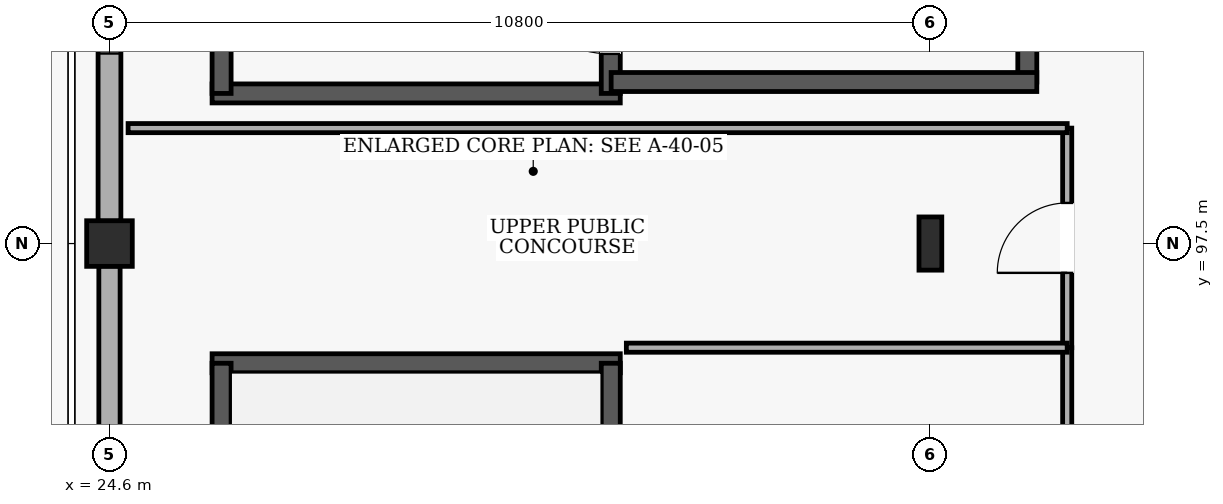
"""IFC4 building model, lengths in metres.
Left out: names, types, materials, properties, quantities, classifications, styles, units other than length and angle.
Written with IfcOpenShell. Run it as: python <this file> out.ifc"""

import sys

from ifc_helpers import new_model, si_unit, direction, frame, frame_2d, origin, origin_2d, place, context, subcontext, project, spatial, rectangle, i_section, extrude, element, fill, save


model = new_model("IFC4")
c1 = context("Model", 3, precision=1e-05, world=origin(), true_north=direction((0.0, 1.0)))
c2 = subcontext(c1, "Body", "Model", "MODEL_VIEW")
j1 = project(units=[si_unit("LENGTHUNIT", "METRE"), si_unit("PLANEANGLEUNIT", "RADIAN")], contexts=[c1])
p1 = place(None, origin())
s1 = spatial("IfcSite", under=j1, at=p1, CompositionType="ELEMENT")
p2 = place(p1, origin())
s2 = spatial("IfcBuilding", under=s1, at=p2, CompositionType="ELEMENT")
p3 = place(p2, frame((0.0, 0.0, 15.0)))
s3 = spatial("IfcBuildingStorey", under=s2, at=p3, CompositionType="ELEMENT", Elevation=15.0)
p4 = place(p3, frame((24.6, 97.5, 0.0), z_axis=(0.0, 0.0, 1.0), x_axis=(1.0, 0.0, 0.0)))
e1 = element("IfcColumn", 1, at=p4, inside=s3, PredefinedType="COLUMN", context=c2, shape_type="SweptSolid", body=[
    extrude(rectangle(XDim=0.6, YDim=0.6, at=origin_2d()), origin(), (0.0, 0.0, 1.0), 4.8),
])
p5 = place(p3, frame((35.4, 97.5, 0.0), z_axis=(0.0, 0.0, 1.0), x_axis=(1.0, 0.0, 0.0)))
e2 = element("IfcColumn", 2, at=p5, inside=s3, PredefinedType="COLUMN", context=c2, shape_type="SweptSolid", body=[
    extrude(i_section(OverallWidth=0.3, OverallDepth=0.7, WebThickness=0.017, FlangeThickness=0.032, at=origin_2d()), origin(), (0.0, 0.0, 1.0), 4.8),
])
p6 = place(p3, frame((24.6, 83.395, 0.0), z_axis=(0.0, 0.0, 1.0), x_axis=(0.0, 1.0, 0.0)))
e3 = element("IfcWall", 3, at=p6, inside=s3, PredefinedType="SOLIDWALL", context=c2, shape_type="SweptSolid", body=[
    extrude(rectangle(XDim=13.81, YDim=0.28, at=frame_2d((6.905, 0.0))), origin(), (0.0, 0.0, 1.0), 3.58),
])
p7 = place(p6, frame((6.005, 0.0, 0.9)))
e4 = element("IfcOpeningElement", 4, at=p7, cuts=e3, PredefinedType="OPENING", context=c2, shape_type="SweptSolid", body=[
    extrude(rectangle(XDim=1.8, YDim=2.1, at=frame_2d((0.9, 1.05))), frame((0.0, 0.15, 0.0), z_axis=(0.0, -1.0, 0.0), x_axis=(1.0, 0.0, 0.0)), (0.0, 0.0, 1.0), 0.3),
])
p8 = place(p3, frame((24.6, 97.795, 0.0), z_axis=(0.0, 0.0, 1.0), x_axis=(0.0, 1.0, 0.0)))
e5 = element("IfcWall", 5, at=p8, inside=s3, PredefinedType="SOLIDWALL", context=c2, shape_type="SweptSolid", body=[
    extrude(rectangle(XDim=6.61, YDim=0.3, at=frame_2d((3.305, 0.0))), origin(), (0.0, 0.0, 1.0), 3.88),
])
p9 = place(p8, frame((2.205, 0.0, 0.9)))
e6 = element("IfcOpeningElement", 6, at=p9, cuts=e5, PredefinedType="OPENING", context=c2, shape_type="SweptSolid", body=[
    extrude(rectangle(XDim=2.2, YDim=2.1, at=frame_2d((1.1, 1.05))), frame((0.0, 0.16, 0.0), z_axis=(0.0, -1.0, 0.0), x_axis=(1.0, 0.0, 0.0)), (0.0, 0.0, 1.0), 0.32),
])
p10 = place(p3, frame((31.32, 95.925, 0.0), z_axis=(0.0, 0.0, 1.0), x_axis=(-1.0, 0.0, 0.0)))
e7 = element("IfcWall", 7, at=p10, inside=s3, PredefinedType="SHEAR", context=c2, shape_type="SweptSolid", body=[
    extrude(rectangle(XDim=5.37, YDim=0.25, at=frame_2d((2.685, 0.0))), origin(), (0.0, 0.0, 1.0), 4.5),
])
p11 = place(p3, frame((26.075, 85.075, 0.0), z_axis=(0.0, 0.0, 1.0), x_axis=(0.0, 1.0, 0.0)))
e8 = element("IfcWall", 8, at=p11, inside=s3, PredefinedType="SHEAR", context=c2, shape_type="SweptSolid", body=[
    extrude(rectangle(XDim=10.85, YDim=0.25, at=frame_2d((5.425, 0.0))), origin(), (0.0, 0.0, 1.0), 4.5),
])
p12 = place(p3, frame((31.195, 85.075, 0.0), z_axis=(0.0, 0.0, 1.0), x_axis=(0.0, 1.0, 0.0)))
e9 = element("IfcWall", 9, at=p12, inside=s3, PredefinedType="SHEAR", context=c2, shape_type="SweptSolid", body=[
    extrude(rectangle(XDim=10.85, YDim=0.25, at=frame_2d((5.425, 0.0))), origin(), (0.0, 0.0, 1.0), 4.5),
])
p13 = place(p12, frame((0.52, 0.0, 0.0)))
e10 = element("IfcOpeningElement", 10, at=p13, cuts=e9, PredefinedType="OPENING", context=c2, shape_type="SweptSolid", body=[
    extrude(rectangle(XDim=1.4, YDim=2.15, at=frame_2d((0.7, 1.075))), frame((0.0, 0.135, 0.0), z_axis=(0.0, -1.0, 0.0), x_axis=(1.0, 0.0, 0.0)), (0.0, 0.0, 1.0), 0.27),
])
p14 = place(p3, frame((25.95, 99.475, 0.0), z_axis=(0.0, 0.0, 1.0), x_axis=(1.0, 0.0, 0.0)))
e11 = element("IfcWall", 11, at=p14, inside=s3, PredefinedType="SHEAR", context=c2, shape_type="SweptSolid", body=[
    extrude(rectangle(XDim=5.37, YDim=0.25, at=frame_2d((2.685, 0.0))), origin(), (0.0, 0.0, 1.0), 4.5),
])
p15 = place(p3, frame((26.075, 99.475, 0.0), z_axis=(0.0, 0.0, 1.0), x_axis=(0.0, 1.0, 0.0)))
e12 = element("IfcWall", 12, at=p15, inside=s3, PredefinedType="SHEAR", context=c2, shape_type="SweptSolid", body=[
    extrude(rectangle(XDim=10.85, YDim=0.25, at=frame_2d((5.425, 0.0))), origin(), (0.0, 0.0, 1.0), 4.5),
])
p16 = place(p3, frame((31.195, 99.475, 0.0), z_axis=(0.0, 0.0, 1.0), x_axis=(0.0, 1.0, 0.0)))
e13 = element("IfcWall", 13, at=p16, inside=s3, PredefinedType="SHEAR", context=c2, shape_type="SweptSolid", body=[
    extrude(rectangle(XDim=10.85, YDim=0.25, at=frame_2d((5.425, 0.0))), origin(), (0.0, 0.0, 1.0), 4.5),
])
p17 = place(p16, frame((0.52, 0.0, 0.0)))
e14 = element("IfcOpeningElement", 14, at=p17, cuts=e13, PredefinedType="OPENING", context=c2, shape_type="SweptSolid", body=[
    extrude(rectangle(XDim=1.4, YDim=2.15, at=frame_2d((0.7, 1.075))), frame((0.0, 0.135, 0.0), z_axis=(0.0, -1.0, 0.0), x_axis=(1.0, 0.0, 0.0)), (0.0, 0.0, 1.0), 0.27),
])
p18 = place(p3, frame((36.675, 99.625, 0.0), z_axis=(0.0, 0.0, 1.0), x_axis=(0.0, 1.0, 0.0)))
e15 = element("IfcWall", 15, at=p18, inside=s3, PredefinedType="SHEAR", context=c2, shape_type="SweptSolid", body=[
    extrude(rectangle(XDim=3.45, YDim=0.25, at=frame_2d((1.725, 0.0))), origin(), (0.0, 0.0, 1.0), 4.5),
])
p19 = place(p18, frame((1.025, 0.0, 0.0)))
e16 = element("IfcOpeningElement", 16, at=p19, cuts=e15, PredefinedType="OPENING", context=c2, shape_type="SweptSolid", body=[
    extrude(rectangle(XDim=1.4, YDim=2.15, at=frame_2d((0.7, 1.075))), frame((0.0, 0.135, 0.0), z_axis=(0.0, -1.0, 0.0), x_axis=(1.0, 0.0, 0.0)), (0.0, 0.0, 1.0), 0.27),
])
p20 = place(p3, frame((31.2, 99.625, 0.0), z_axis=(0.0, 0.0, 1.0), x_axis=(1.0, 0.0, 0.0)))
e17 = element("IfcWall", 17, at=p20, inside=s3, PredefinedType="SHEAR", context=c2, shape_type="SweptSolid", body=[
    extrude(rectangle(XDim=5.6, YDim=0.25, at=frame_2d((2.8, 0.0))), origin(), (0.0, 0.0, 1.0), 4.5),
])
p21 = place(p3, frame((37.2, 96.13, 0.0), z_axis=(0.0, 0.0, 1.0), x_axis=(0.0, 1.0, 0.0)))
e18 = element("IfcWall", 18, at=p21, inside=s3, PredefinedType="PARTITIONING", context=c2, shape_type="SweptSolid", body=[
    extrude(rectangle(XDim=2.889, YDim=0.12, at=frame_2d((1.444, 0.0))), origin(), (0.0, 0.0, 1.0), 4.5),
])
p22 = place(p21, frame((0.984, 0.0, 0.0)))
e19 = element("IfcOpeningElement", 19, at=p22, cuts=e18, PredefinedType="OPENING", context=c2, shape_type="SweptSolid", body=[
    extrude(rectangle(XDim=0.92, YDim=2.1, at=frame_2d((0.46, 1.05))), frame((0.0, 0.07, 0.0), z_axis=(0.0, -1.0, 0.0), x_axis=(1.0, 0.0, 0.0)), (0.0, 0.0, 1.0), 0.14),
])
p23 = place(p3, frame((37.2, 99.019, 0.0), z_axis=(0.0, 0.0, 1.0), x_axis=(-1.0, 0.0, 0.0)))
e20 = element("IfcWall", 20, at=p23, inside=s3, PredefinedType="PARTITIONING", context=c2, shape_type="SweptSolid", body=[
    extrude(rectangle(XDim=12.355, YDim=0.12, at=frame_2d((6.177, 0.0))), origin(), (0.0, 0.0, 1.0), 4.5),
])
p24 = place(p3, frame((37.2, 91.68, 0.0), z_axis=(0.0, 0.0, 1.0), x_axis=(0.0, 1.0, 0.0)))
e21 = element("IfcWall", 21, at=p24, inside=s3, PredefinedType="PARTITIONING", context=c2, shape_type="SweptSolid", body=[
    extrude(rectangle(XDim=4.45, YDim=0.12, at=frame_2d((2.225, 0.0))), origin(), (0.0, 0.0, 1.0), 4.5),
])
p25 = place(p24, frame((1.525, 0.0, 0.0)))
e22 = element("IfcOpeningElement", 22, at=p25, cuts=e21, PredefinedType="OPENING", context=c2, shape_type="SweptSolid", body=[
    extrude(rectangle(XDim=1.4, YDim=2.2, at=frame_2d((0.7, 1.1))), frame((0.0, 0.07, 0.0), z_axis=(0.0, -1.0, 0.0), x_axis=(1.0, 0.0, 0.0)), (0.0, 0.0, 1.0), 0.14),
])
p26 = place(p3, frame((37.2, 96.13, 0.0), z_axis=(0.0, 0.0, 1.0), x_axis=(-1.0, 0.0, 0.0)))
e23 = element("IfcWall", 23, at=p26, inside=s3, PredefinedType="PARTITIONING", context=c2, shape_type="SweptSolid", body=[
    extrude(rectangle(XDim=5.8, YDim=0.12, at=frame_2d((2.9, 0.0))), origin(), (0.0, 0.0, 1.0), 4.5),
])
p27 = place(p9, origin())
e24 = element("IfcWindow", 24, at=p27, inside=s3, PartitioningType="SINGLE_PANEL", PredefinedType="WINDOW", context=c2, shape_type="SweptSolid", body=[
    extrude(rectangle(XDim=2.2, YDim=2.1, at=frame_2d((1.1, 1.05))), frame((0.0, 0.03, 0.0), z_axis=(0.0, -1.0, 0.0), x_axis=(1.0, 0.0, 0.0)), (0.0, 0.0, 1.0), 0.06),
])
fill(e6, e24)
p28 = place(p17, origin())
e25 = element("IfcDoor", 25, at=p28, inside=s3, OperationType="SINGLE_SWING_RIGHT", PredefinedType="DOOR", context=c2, shape_type="SweptSolid", body=[
    extrude(rectangle(XDim=1.4, YDim=2.15, at=frame_2d((0.7, 1.075))), frame((0.0, 0.025, 0.0), z_axis=(0.0, -1.0, 0.0), x_axis=(1.0, 0.0, 0.0)), (0.0, 0.0, 1.0), 0.05),
])
fill(e14, e25)
p29 = place(p22, origin())
e26 = element("IfcDoor", 26, at=p29, inside=s3, OperationType="SINGLE_SWING_LEFT", PredefinedType="DOOR", context=c2, shape_type="SweptSolid", body=[
    extrude(rectangle(XDim=0.92, YDim=2.1, at=frame_2d((0.46, 1.05))), frame((0.0, 0.025, 0.0), z_axis=(0.0, -1.0, 0.0), x_axis=(1.0, 0.0, 0.0)), (0.0, 0.0, 1.0), 0.05),
])
fill(e19, e26)
save(model, sys.argv[1])
